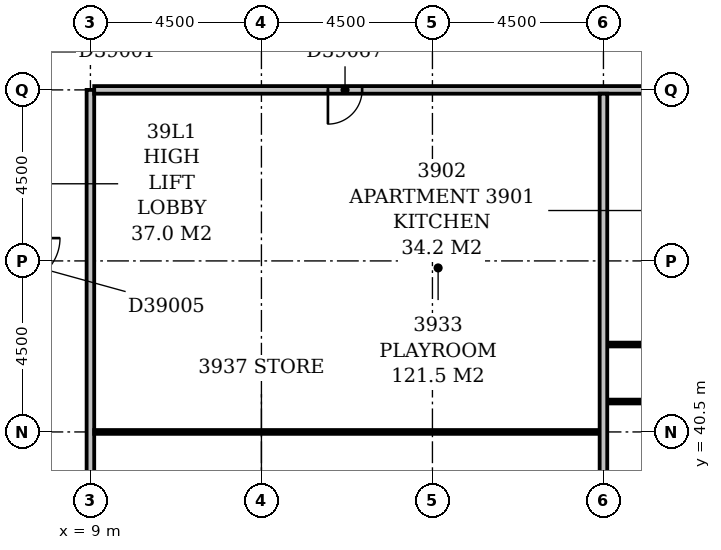
"""IFC4 building model, lengths in metres.
Left out: names, types, materials, properties, quantities, classifications, styles, units other than length and angle.
Written with IfcOpenShell. Run it as: python <this file> out.ifc"""

import sys

from ifc_helpers import new_model, si_unit, direction, frame, frame_2d, origin, place, context, subcontext, project, spatial, rectangle, extrude, element, fill, save


model = new_model("IFC4")
c1 = context("Model", 3, precision=1e-05, world=origin(), true_north=direction((0.0, 1.0)))
c2 = subcontext(c1, "Body", "Model", "MODEL_VIEW")
j1 = project(units=[si_unit("LENGTHUNIT", "METRE"), si_unit("PLANEANGLEUNIT", "RADIAN")], contexts=[c1])
p1 = place(None, origin())
s1 = spatial("IfcSite", under=j1, at=p1, CompositionType="ELEMENT")
p2 = place(p1, origin())
s2 = spatial("IfcBuilding", under=s1, at=p2, CompositionType="ELEMENT")
p3 = place(p2, frame((0.0, 0.0, 155.6)))
s3 = spatial("IfcBuildingStorey", under=s2, at=p3, CompositionType="ELEMENT", Elevation=155.6)
p4 = place(p3, frame((9.0, 34.75, 0.0), z_axis=(0.0, 0.0, 1.0), x_axis=(0.0, 1.0, 0.0)))
e1 = element("IfcWall", 1, at=p4, inside=s3, PredefinedType="PARTITIONING", context=c2, shape_type="SweptSolid", body=[
    extrude(rectangle(XDim=14.75, YDim=0.2, at=frame_2d((7.375, 0.0))), origin(), (0.0, 0.0, 1.0), 3.3),
])
p5 = place(p4, frame((3.0, 0.0, 0.0)))
e2 = element("IfcOpeningElement", 2, at=p5, cuts=e1, PredefinedType="OPENING", context=c2, shape_type="SweptSolid", body=[
    extrude(rectangle(XDim=0.9, YDim=2.1, at=frame_2d((0.45, 1.05))), frame((0.0, 0.112, 0.0), z_axis=(0.0, -1.0, 0.0), x_axis=(1.0, 0.0, 0.0)), (0.0, 0.0, 1.0), 0.224),
])
p6 = place(p3, frame((22.5, 36.5, 0.0), z_axis=(0.0, 0.0, 1.0), x_axis=(0.0, 1.0, 0.0)))
e3 = element("IfcWall", 3, at=p6, inside=s3, PredefinedType="PARTITIONING", context=c2, shape_type="SweptSolid", body=[
    extrude(rectangle(XDim=12.9, YDim=0.2, at=frame_2d((6.45, 0.0))), origin(), (0.0, 0.0, 1.0), 3.3),
])
p7 = place(p3, frame((9.1, 40.5, 0.0), z_axis=(0.0, 0.0, 1.0), x_axis=(1.0, 0.0, 0.0)))
e4 = element("IfcWall", 4, at=p7, inside=s3, PredefinedType="PARTITIONING", context=c2, shape_type="SweptSolid", body=[
    extrude(rectangle(XDim=13.3, YDim=0.1, at=frame_2d((6.65, 0.0))), origin(), (0.0, 0.0, 1.0), 3.3),
])
p8 = place(p3, frame((22.6, 41.3, 0.0), z_axis=(0.0, 0.0, 1.0), x_axis=(1.0, 0.0, 0.0)))
e5 = element("IfcWall", 5, at=p8, inside=s3, PredefinedType="PARTITIONING", context=c2, shape_type="SweptSolid", body=[
    extrude(rectangle(XDim=17.8, YDim=0.1, at=frame_2d((8.9, 0.0))), origin(), (0.0, 0.0, 1.0), 3.3),
])
p9 = place(p8, frame((3.9, 0.0, 0.0)))
e6 = element("IfcOpeningElement", 6, at=p9, cuts=e5, PredefinedType="OPENING", context=c2, shape_type="SweptSolid", body=[
    extrude(rectangle(XDim=0.9, YDim=2.1, at=frame_2d((0.45, 1.05))), frame((0.0, 0.062, 0.0), z_axis=(0.0, -1.0, 0.0), x_axis=(1.0, 0.0, 0.0)), (0.0, 0.0, 1.0), 0.124),
])
p10 = place(p8, frame((10.7, 0.0, 0.0)))
e7 = element("IfcOpeningElement", 7, at=p10, cuts=e5, PredefinedType="OPENING", context=c2, shape_type="SweptSolid", body=[
    extrude(rectangle(XDim=0.9, YDim=2.1, at=frame_2d((0.45, 1.05))), frame((0.0, 0.062, 0.0), z_axis=(0.0, -1.0, 0.0), x_axis=(1.0, 0.0, 0.0)), (0.0, 0.0, 1.0), 0.124),
])
p11 = place(p8, frame((14.05, 0.0, 0.0)))
e8 = element("IfcOpeningElement", 8, at=p11, cuts=e5, PredefinedType="OPENING", context=c2, shape_type="SweptSolid", body=[
    extrude(rectangle(XDim=0.9, YDim=2.1, at=frame_2d((0.45, 1.05))), frame((0.0, 0.062, 0.0), z_axis=(0.0, -1.0, 0.0), x_axis=(1.0, 0.0, 0.0)), (0.0, 0.0, 1.0), 0.124),
])
p12 = place(p3, frame((22.6, 42.8, 0.0), z_axis=(0.0, 0.0, 1.0), x_axis=(1.0, 0.0, 0.0)))
e9 = element("IfcWall", 9, at=p12, inside=s3, PredefinedType="PARTITIONING", context=c2, shape_type="SweptSolid", body=[
    extrude(rectangle(XDim=4.95, YDim=0.1, at=frame_2d((2.475, 0.0))), origin(), (0.0, 0.0, 1.0), 3.3),
])
p13 = place(p12, frame((2.0, 0.0, 0.0)))
e10 = element("IfcOpeningElement", 10, at=p13, cuts=e9, PredefinedType="OPENING", context=c2, shape_type="SweptSolid", body=[
    extrude(rectangle(XDim=0.9, YDim=2.1, at=frame_2d((0.45, 1.05))), frame((0.0, 0.062, 0.0), z_axis=(0.0, -1.0, 0.0), x_axis=(1.0, 0.0, 0.0)), (0.0, 0.0, 1.0), 0.124),
])
p14 = place(p3, frame((9.1, 49.5, 0.0), z_axis=(0.0, 0.0, 1.0), x_axis=(1.0, 0.0, 0.0)))
e11 = element("IfcWall", 11, at=p14, inside=s3, PredefinedType="PARTITIONING", context=c2, shape_type="SweptSolid", body=[
    extrude(rectangle(XDim=32.55, YDim=0.2, at=frame_2d((16.275, 0.0))), origin(), (0.0, 0.0, 1.0), 3.3),
])
p15 = place(p14, frame((18.8, 0.0, 0.0)))
e12 = element("IfcOpeningElement", 12, at=p15, cuts=e11, PredefinedType="OPENING", context=c2, shape_type="SweptSolid", body=[
    extrude(rectangle(XDim=1.0, YDim=2.1, at=frame_2d((0.5, 1.05))), frame((0.0, 0.112, 0.0), z_axis=(0.0, -1.0, 0.0), x_axis=(1.0, 0.0, 0.0)), (0.0, 0.0, 1.0), 0.224),
])
p16 = place(p14, frame((6.15, 0.0, 0.0)))
e13 = element("IfcOpeningElement", 13, at=p16, cuts=e11, PredefinedType="OPENING", context=c2, shape_type="SweptSolid", body=[
    extrude(rectangle(XDim=0.9, YDim=2.1, at=frame_2d((0.45, 1.05))), frame((0.0, 0.112, 0.0), z_axis=(0.0, -1.0, 0.0), x_axis=(1.0, 0.0, 0.0)), (0.0, 0.0, 1.0), 0.224),
])
p17 = place(p16, frame((0.9, 0.0, 0.0), z_axis=(0.0, 0.0, 1.0), x_axis=(-1.0, 0.0, 0.0)))
e14 = element("IfcDoor", 14, at=p17, inside=s3, OperationType="SINGLE_SWING_RIGHT", PredefinedType="DOOR", context=c2, shape_type="SweptSolid", body=[
    extrude(rectangle(XDim=0.9, YDim=2.1, at=frame_2d((0.45, 1.05))), frame((0.0, 0.025, 0.0), z_axis=(0.0, -1.0, 0.0), x_axis=(1.0, 0.0, 0.0)), (0.0, 0.0, 1.0), 0.05),
])
fill(e13, e14)
save(model, sys.argv[1])
